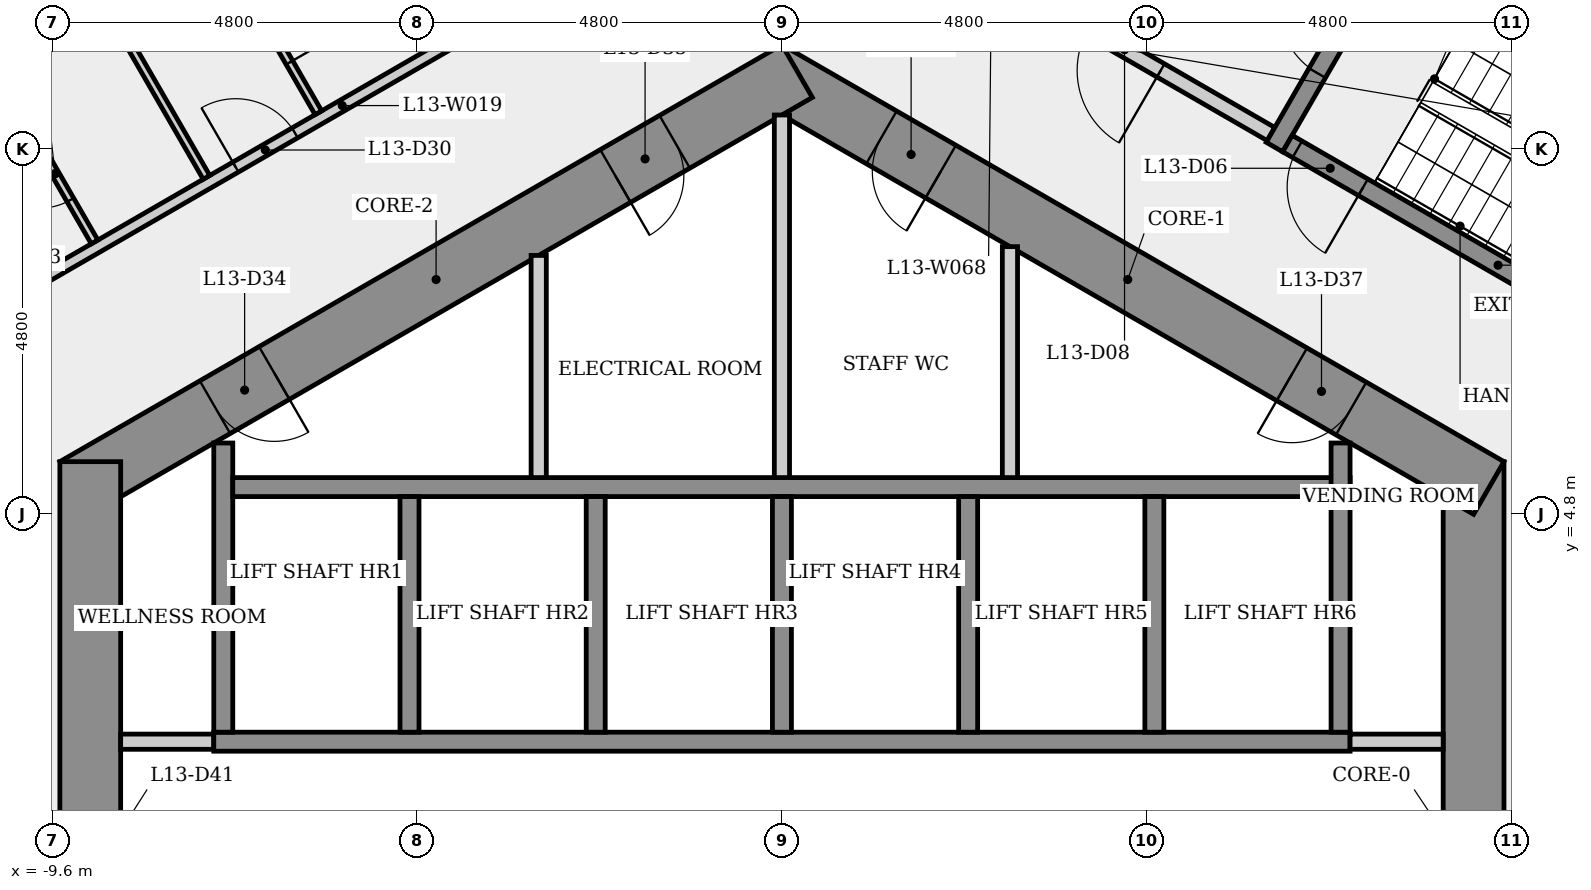
"""IFC4 building model, lengths in metres.
Left out: names, types, materials, properties, quantities, classifications, styles, units other than length and angle.
Written with IfcOpenShell. Run it as: python <this file> out.ifc"""

import sys

from ifc_helpers import new_model, si_unit, direction, frame, frame_2d, origin, place, context, subcontext, project, spatial, rectangle, extrude, element, fill, save


model = new_model("IFC4")
c1 = context("Model", 3, precision=1e-05, world=origin(), true_north=direction((0.0, 1.0)))
c2 = subcontext(c1, "Body", "Model", "MODEL_VIEW")
j1 = project(units=[si_unit("LENGTHUNIT", "METRE"), si_unit("PLANEANGLEUNIT", "RADIAN")], contexts=[c1])
p1 = place(None, origin())
s1 = spatial("IfcSite", under=j1, at=p1, CompositionType="ELEMENT")
p2 = place(p1, origin())
s2 = spatial("IfcBuilding", under=s1, at=p2, CompositionType="ELEMENT")
p3 = place(p2, frame((0.0, 0.0, 52.7)))
s3 = spatial("IfcBuildingStorey", under=s2, at=p3, CompositionType="ELEMENT", Elevation=52.7)
p4 = place(p3, frame((9.1, -5.485, 0.0), z_axis=(0.0, 0.0, 1.0), x_axis=(0.0, 1.0, 0.0)))
e1 = element("IfcWall", 1, at=p4, inside=s3, PredefinedType="SHEAR", context=c2, shape_type="SweptSolid", body=[
    extrude(rectangle(XDim=10.97, YDim=0.8, at=frame_2d((5.485, 0.0))), origin(), (0.0, 0.0, 1.0), 3.4),
])
p5 = place(p4, frame((4.685, 0.0, 0.0)))
e2 = element("IfcOpeningElement", 2, at=p5, cuts=e1, PredefinedType="OPENING", context=c2, shape_type="SweptSolid", body=[
    extrude(rectangle(XDim=1.6, YDim=2.1, at=frame_2d((0.8, 1.05))), frame((0.0, 0.41, 0.0), z_axis=(0.0, -1.0, 0.0), x_axis=(1.0, 0.0, 0.0)), (0.0, 0.0, 1.0), 0.82),
])
p6 = place(p3, frame((9.3, 5.138, 0.0), z_axis=(0.0, 0.0, 1.0), x_axis=(-0.866023993627, 0.500002442456, 0.0)))
e3 = element("IfcWall", 3, at=p6, inside=s3, PredefinedType="SHEAR", context=c2, shape_type="SweptSolid", body=[
    extrude(rectangle(XDim=10.97, YDim=0.8, at=frame_2d((5.485, 0.0))), origin(), (0.0, 0.0, 1.0), 3.4),
])
p7 = place(p6, frame((8.326, 0.0, 0.0)))
e4 = element("IfcOpeningElement", 4, at=p7, cuts=e3, PredefinedType="OPENING", context=c2, shape_type="SweptSolid", body=[
    extrude(rectangle(XDim=0.9, YDim=2.1, at=frame_2d((0.45, 1.05))), frame((0.0, 0.41, 0.0), z_axis=(0.0, -1.0, 0.0), x_axis=(1.0, 0.0, 0.0)), (0.0, 0.0, 1.0), 0.82),
])
p8 = place(p6, frame((2.091, 0.0, 0.0)))
e5 = element("IfcOpeningElement", 5, at=p8, cuts=e3, PredefinedType="OPENING", context=c2, shape_type="SweptSolid", body=[
    extrude(rectangle(XDim=0.9, YDim=2.1, at=frame_2d((0.45, 1.05))), frame((0.0, 0.41, 0.0), z_axis=(0.0, -1.0, 0.0), x_axis=(1.0, 0.0, 0.0)), (0.0, 0.0, 1.0), 0.82),
])
p9 = place(p3, frame((0.2, 10.623, 0.0), z_axis=(0.0, 0.0, 1.0), x_axis=(-0.866023993627, -0.500002442456, 0.0)))
e6 = element("IfcWall", 6, at=p9, inside=s3, PredefinedType="SHEAR", context=c2, shape_type="SweptSolid", body=[
    extrude(rectangle(XDim=10.97, YDim=0.8, at=frame_2d((5.485, 0.0))), origin(), (0.0, 0.0, 1.0), 3.4),
])
p10 = place(p9, frame((7.944, 0.0, 0.0)))
e7 = element("IfcOpeningElement", 7, at=p10, cuts=e6, PredefinedType="OPENING", context=c2, shape_type="SweptSolid", body=[
    extrude(rectangle(XDim=0.9, YDim=2.1, at=frame_2d((0.45, 1.05))), frame((0.0, 0.41, 0.0), z_axis=(0.0, -1.0, 0.0), x_axis=(1.0, 0.0, 0.0)), (0.0, 0.0, 1.0), 0.82),
])
p11 = place(p9, frame((1.86, 0.0, 0.0)))
e8 = element("IfcOpeningElement", 8, at=p11, cuts=e6, PredefinedType="OPENING", context=c2, shape_type="SweptSolid", body=[
    extrude(rectangle(XDim=0.9, YDim=2.1, at=frame_2d((0.45, 1.05))), frame((0.0, 0.41, 0.0), z_axis=(0.0, -1.0, 0.0), x_axis=(1.0, 0.0, 0.0)), (0.0, 0.0, 1.0), 0.82),
])
p12 = place(p3, frame((-9.1, 5.485, 0.0), z_axis=(0.0, 0.0, 1.0), x_axis=(0.0, -1.0, 0.0)))
e9 = element("IfcWall", 9, at=p12, inside=s3, PredefinedType="SHEAR", context=c2, shape_type="SweptSolid", body=[
    extrude(rectangle(XDim=10.97, YDim=0.8, at=frame_2d((5.485, 0.0))), origin(), (0.0, 0.0, 1.0), 3.4),
])
p13 = place(p12, frame((4.685, 0.0, 0.0)))
e10 = element("IfcOpeningElement", 10, at=p13, cuts=e9, PredefinedType="OPENING", context=c2, shape_type="SweptSolid", body=[
    extrude(rectangle(XDim=1.6, YDim=2.1, at=frame_2d((0.8, 1.05))), frame((0.0, 0.41, 0.0), z_axis=(0.0, -1.0, 0.0), x_axis=(1.0, 0.0, 0.0)), (0.0, 0.0, 1.0), 0.82),
])
p14 = place(p3, frame((-10.836, 7.254, 0.0), z_axis=(0.0, 0.0, 1.0), x_axis=(0.866028032582, 0.499995446761, 0.0)))
e11 = element("IfcWall", 11, at=p14, inside=s3, PredefinedType="PARTITIONING", context=c2, shape_type="SweptSolid", body=[
    extrude(rectangle(XDim=11.664, YDim=0.15, at=frame_2d((5.832, 0.0))), origin(), (0.0, 0.0, 1.0), 3.05),
])
p15 = place(p14, frame((4.213, 0.0, 0.0)))
e12 = element("IfcOpeningElement", 12, at=p15, cuts=e11, PredefinedType="OPENING", context=c2, shape_type="SweptSolid", body=[
    extrude(rectangle(XDim=0.9, YDim=2.1, at=frame_2d((0.45, 1.05))), frame((0.0, 0.085, 0.0), z_axis=(0.0, -1.0, 0.0), x_axis=(1.0, 0.0, 0.0)), (0.0, 0.0, 1.0), 0.17),
])
p16 = place(p3, frame((-9.043, 8.375, 0.0), z_axis=(0.0, 0.0, 1.0), x_axis=(-0.500011000363, 0.866019052629, 0.0)))
e13 = element("IfcWall", 13, at=p16, inside=s3, PredefinedType="PARTITIONING", context=c2, shape_type="SweptSolid", body=[
    extrude(rectangle(XDim=2.075, YDim=0.1, at=frame_2d((1.038, 0.0))), origin(), (0.0, 0.0, 1.0), 3.05),
])
p17 = place(p16, frame((0.637, 0.0, 0.0)))
e14 = element("IfcOpeningElement", 14, at=p17, cuts=e13, PredefinedType="OPENING", context=c2, shape_type="SweptSolid", body=[
    extrude(rectangle(XDim=0.8, YDim=2.1, at=frame_2d((0.4, 1.05))), frame((0.0, 0.06, 0.0), z_axis=(0.0, -1.0, 0.0), x_axis=(1.0, 0.0, 0.0)), (0.0, 0.0, 1.0), 0.12),
])
p18 = place(p3, frame((-8.7, 1.8, 0.0), z_axis=(0.0, 0.0, 1.0), x_axis=(1.0, 0.0, 0.0)))
e15 = element("IfcWall", 15, at=p18, inside=s3, PredefinedType="PARTITIONING", context=c2, shape_type="SweptSolid", body=[
    extrude(rectangle(XDim=1.225, YDim=0.2, at=frame_2d((0.613, 0.0))), origin(), (0.0, 0.0, 1.0), 3.05),
])
p19 = place(p3, frame((-7.571, 9.226, 0.0), z_axis=(0.0, 0.0, 1.0), x_axis=(-0.499989081013, 0.866031707772, 0.0)))
e16 = element("IfcWall", 16, at=p19, inside=s3, PredefinedType="PARTITIONING", context=c2, shape_type="SweptSolid", body=[
    extrude(rectangle(XDim=9.01, YDim=0.1, at=frame_2d((4.505, 0.0))), origin(), (0.0, 0.0, 1.0), 3.05),
])
p20 = place(p3, frame((-7.475, 1.8, 0.0), z_axis=(0.0, 0.0, 1.0), x_axis=(1.0, 0.0, 0.0)))
e17 = element("IfcWall", 17, at=p20, inside=s3, PredefinedType="SHEAR", context=c2, shape_type="SweptSolid", body=[
    extrude(rectangle(XDim=14.95, YDim=0.25, at=frame_2d((7.475, 0.0))), origin(), (0.0, 0.0, 1.0), 3.05),
])
p21 = place(p3, frame((-7.35, 1.925, 0.0), z_axis=(0.0, 0.0, 1.0), x_axis=(0.0, 1.0, 0.0)))
e18 = element("IfcWall", 18, at=p21, inside=s3, PredefinedType="SHEAR", context=c2, shape_type="SweptSolid", body=[
    extrude(rectangle(XDim=3.805, YDim=0.25, at=frame_2d((1.903, 0.0))), origin(), (0.0, 0.0, 1.0), 3.05),
])
p22 = place(p3, frame((-7.225, 5.15, 0.0), z_axis=(0.0, 0.0, 1.0), x_axis=(1.0, 0.0, 0.0)))
e19 = element("IfcWall", 19, at=p22, inside=s3, PredefinedType="SHEAR", context=c2, shape_type="SweptSolid", body=[
    extrude(rectangle(XDim=14.7, YDim=0.25, at=frame_2d((7.35, 0.0))), origin(), (0.0, 0.0, 1.0), 3.05),
])
p23 = place(p3, frame((-7.286, 12.132, 0.0), z_axis=(0.0, 0.0, 1.0), x_axis=(0.499986429846, -0.866033238375, 0.0)))
e20 = element("IfcWall", 20, at=p23, inside=s3, PredefinedType="PARTITIONING", context=c2, shape_type="SweptSolid", body=[
    extrude(rectangle(XDim=2.375, YDim=0.1, at=frame_2d((1.188, 0.0))), origin(), (0.0, 0.0, 1.0), 3.05),
])
p24 = place(p23, frame((0.812, 0.0, 0.0)))
e21 = element("IfcOpeningElement", 21, at=p24, cuts=e20, PredefinedType="OPENING", context=c2, shape_type="SweptSolid", body=[
    extrude(rectangle(XDim=0.8, YDim=2.1, at=frame_2d((0.4, 1.05))), frame((0.0, 0.06, 0.0), z_axis=(0.0, -1.0, 0.0), x_axis=(1.0, 0.0, 0.0)), (0.0, 0.0, 1.0), 0.12),
])
p25 = place(p3, frame((-4.9, 5.025, 0.0), z_axis=(0.0, 0.0, 1.0), x_axis=(0.0, -1.0, 0.0)))
e22 = element("IfcWall", 22, at=p25, inside=s3, PredefinedType="SHEAR", context=c2, shape_type="SweptSolid", body=[
    extrude(rectangle(XDim=3.1, YDim=0.25, at=frame_2d((1.55, 0.0))), origin(), (0.0, 0.0, 1.0), 3.4),
])
p26 = place(p3, frame((-3.2, 8.198, 0.0), z_axis=(0.0, 0.0, 1.0), x_axis=(0.0, -1.0, 0.0)))
e23 = element("IfcWall", 23, at=p26, inside=s3, PredefinedType="PARTITIONING", context=c2, shape_type="SweptSolid", body=[
    extrude(rectangle(XDim=2.924, YDim=0.2, at=frame_2d((1.462, 0.0))), origin(), (0.0, 0.0, 1.0), 3.05),
])
for number, where, z_axis, x_axis in (
    (24, (-2.45, 5.025, 0.0), (0.0, 0.0, 1.0), (0.0, -1.0, 0.0)),
    (25, (0.0, 5.025, 0.0), (0.0, 0.0, 1.0), (0.0, -1.0, 0.0)),
):
    element("IfcWall", number, at=place(p3, frame(where, z_axis=z_axis, x_axis=x_axis)), inside=s3, PredefinedType="SHEAR", context=c2, shape_type="SweptSolid", body=[
        extrude(rectangle(XDim=3.1, YDim=0.25, at=frame_2d((1.55, 0.0))), origin(), (0.0, 0.0, 1.0), 3.4),
    ])
p27 = place(p3, frame((0.0, 10.046, 0.0), z_axis=(0.0, 0.0, 1.0), x_axis=(0.0, -1.0, 0.0)))
e26 = element("IfcWall", 26, at=p27, inside=s3, PredefinedType="PARTITIONING", context=c2, shape_type="SweptSolid", body=[
    extrude(rectangle(XDim=4.771, YDim=0.2, at=frame_2d((2.385, 0.0))), origin(), (0.0, 0.0, 1.0), 3.05),
])
p28 = place(p3, frame((2.45, 5.025, 0.0), z_axis=(0.0, 0.0, 1.0), x_axis=(0.0, -1.0, 0.0)))
e27 = element("IfcWall", 27, at=p28, inside=s3, PredefinedType="SHEAR", context=c2, shape_type="SweptSolid", body=[
    extrude(rectangle(XDim=3.1, YDim=0.25, at=frame_2d((1.55, 0.0))), origin(), (0.0, 0.0, 1.0), 3.4),
])
p29 = place(p3, frame((3.0, 8.314, 0.0), z_axis=(0.0, 0.0, 1.0), x_axis=(0.0, -1.0, 0.0)))
e28 = element("IfcWall", 28, at=p29, inside=s3, PredefinedType="PARTITIONING", context=c2, shape_type="SweptSolid", body=[
    extrude(rectangle(XDim=3.039, YDim=0.2, at=frame_2d((1.52, 0.0))), origin(), (0.0, 0.0, 1.0), 3.05),
])
p30 = place(p3, frame((4.9, 5.025, 0.0), z_axis=(0.0, 0.0, 1.0), x_axis=(0.0, -1.0, 0.0)))
e29 = element("IfcWall", 29, at=p30, inside=s3, PredefinedType="SHEAR", context=c2, shape_type="SweptSolid", body=[
    extrude(rectangle(XDim=3.1, YDim=0.25, at=frame_2d((1.55, 0.0))), origin(), (0.0, 0.0, 1.0), 3.4),
])
p31 = place(p3, frame((6.435, 9.795, 0.0), z_axis=(0.0, 0.0, 1.0), x_axis=(-0.866012907634, 0.500021643343, 0.0)))
e30 = element("IfcWall", 30, at=p31, inside=s3, PredefinedType="PARTITIONING", context=c2, shape_type="SweptSolid", body=[
    extrude(rectangle(XDim=4.45, YDim=0.2, at=frame_2d((2.225, 0.0))), origin(), (0.0, 0.0, 1.0), 3.05),
])
p32 = place(p31, frame((1.675, 0.0, 0.0)))
e31 = element("IfcOpeningElement", 31, at=p32, cuts=e30, PredefinedType="OPENING", context=c2, shape_type="SweptSolid", body=[
    extrude(rectangle(XDim=1.1, YDim=2.1, at=frame_2d((0.55, 1.05))), frame((0.0, 0.11, 0.0), z_axis=(0.0, -1.0, 0.0), x_axis=(1.0, 0.0, 0.0)), (0.0, 0.0, 1.0), 0.22),
])
p33 = place(p3, frame((6.48, 9.624, 0.0), z_axis=(0.0, 0.0, 1.0), x_axis=(0.500017246033, 0.866015446554, 0.0)))
e32 = element("IfcWall", 32, at=p33, inside=s3, PredefinedType="SHEAR", context=c2, shape_type="SweptSolid", body=[
    extrude(rectangle(XDim=3.25, YDim=0.25, at=frame_2d((1.625, 0.0))), origin(), (0.0, 0.0, 1.0), 3.05),
])
p34 = place(p33, frame((1.125, 0.0, 0.0)))
e33 = element("IfcOpeningElement", 33, at=p34, cuts=e32, PredefinedType="OPENING", context=c2, shape_type="SweptSolid", body=[
    extrude(rectangle(XDim=1.0, YDim=2.1, at=frame_2d((0.5, 1.05))), frame((0.0, 0.135, 0.0), z_axis=(0.0, -1.0, 0.0), x_axis=(1.0, 0.0, 0.0)), (0.0, 0.0, 1.0), 0.27),
])
p35 = place(p3, frame((7.475, 1.8, 0.0), z_axis=(0.0, 0.0, 1.0), x_axis=(1.0, 0.0, 0.0)))
e34 = element("IfcWall", 34, at=p35, inside=s3, PredefinedType="PARTITIONING", context=c2, shape_type="SweptSolid", body=[
    extrude(rectangle(XDim=1.225, YDim=0.2, at=frame_2d((0.613, 0.0))), origin(), (0.0, 0.0, 1.0), 3.05),
])
p36 = place(p3, frame((7.35, 5.73, 0.0), z_axis=(0.0, 0.0, 1.0), x_axis=(0.0, -1.0, 0.0)))
e35 = element("IfcWall", 35, at=p36, inside=s3, PredefinedType="SHEAR", context=c2, shape_type="SweptSolid", body=[
    extrude(rectangle(XDim=3.805, YDim=0.25, at=frame_2d((1.903, 0.0))), origin(), (0.0, 0.0, 1.0), 3.05),
])
p37 = place(p3, frame((8.151, 12.268, 0.0), z_axis=(0.0, 0.0, 1.0), x_axis=(0.866025499775, -0.499999833739, 0.0)))
e36 = element("IfcWall", 36, at=p37, inside=s3, PredefinedType="SHEAR", context=c2, shape_type="SweptSolid", body=[
    extrude(rectangle(XDim=6.4, YDim=0.25, at=frame_2d((3.2, 0.0))), origin(), (0.0, 0.0, 1.0), 3.05),
])
p38 = place(p3, frame((12.194, 6.47, 0.0), z_axis=(0.0, 0.0, 1.0), x_axis=(-0.866025499775, 0.499999833739, 0.0)))
e37 = element("IfcWall", 37, at=p38, inside=s3, PredefinedType="SHEAR", context=c2, shape_type="SweptSolid", body=[
    extrude(rectangle(XDim=6.4, YDim=0.25, at=frame_2d((3.2, 0.0))), origin(), (0.0, 0.0, 1.0), 3.05),
])
p39 = place(p38, frame((5.25, 0.0, 0.0)))
e38 = element("IfcOpeningElement", 38, at=p39, cuts=e37, PredefinedType="OPENING", context=c2, shape_type="SweptSolid", body=[
    extrude(rectangle(XDim=1.0, YDim=2.1, at=frame_2d((0.5, 1.05))), frame((0.0, 0.135, 0.0), z_axis=(0.0, -1.0, 0.0), x_axis=(1.0, 0.0, 0.0)), (0.0, 0.0, 1.0), 0.27),
])
p40 = place(p39, origin())
e39 = element("IfcDoor", 39, at=p40, inside=s3, OperationType="SINGLE_SWING_LEFT", PredefinedType="DOOR", context=c2, shape_type="SweptSolid", body=[
    extrude(rectangle(XDim=1.0, YDim=2.1, at=frame_2d((0.5, 1.05))), frame((0.0, 0.025, 0.0), z_axis=(0.0, -1.0, 0.0), x_axis=(1.0, 0.0, 0.0)), (0.0, 0.0, 1.0), 0.05),
])
fill(e38, e39)
p41 = place(p34, origin())
e40 = element("IfcDoor", 40, at=p41, inside=s3, OperationType="SINGLE_SWING_RIGHT", PredefinedType="DOOR", context=c2, shape_type="SweptSolid", body=[
    extrude(rectangle(XDim=1.0, YDim=2.1, at=frame_2d((0.5, 1.05))), frame((0.0, 0.025, 0.0), z_axis=(0.0, -1.0, 0.0), x_axis=(1.0, 0.0, 0.0)), (0.0, 0.0, 1.0), 0.05),
])
fill(e33, e40)
p42 = place(p32, origin())
e41 = element("IfcDoor", 41, at=p42, inside=s3, OperationType="SINGLE_SWING_LEFT", PredefinedType="DOOR", context=c2, shape_type="SweptSolid", body=[
    extrude(rectangle(XDim=1.1, YDim=2.1, at=frame_2d((0.55, 1.05))), frame((0.0, 0.025, 0.0), z_axis=(0.0, -1.0, 0.0), x_axis=(1.0, 0.0, 0.0)), (0.0, 0.0, 1.0), 0.05),
])
fill(e31, e41)
p43 = place(p15, origin())
e42 = element("IfcDoor", 42, at=p43, inside=s3, OperationType="SINGLE_SWING_LEFT", PredefinedType="DOOR", context=c2, shape_type="SweptSolid", body=[
    extrude(rectangle(XDim=0.9, YDim=2.1, at=frame_2d((0.45, 1.05))), frame((0.0, 0.025, 0.0), z_axis=(0.0, -1.0, 0.0), x_axis=(1.0, 0.0, 0.0)), (0.0, 0.0, 1.0), 0.05),
])
fill(e12, e42)
p44 = place(p24, origin())
e43 = element("IfcDoor", 43, at=p44, inside=s3, OperationType="SINGLE_SWING_RIGHT", PredefinedType="DOOR", context=c2, shape_type="SweptSolid", body=[
    extrude(rectangle(XDim=0.8, YDim=2.1, at=frame_2d((0.4, 1.05))), frame((0.0, 0.025, 0.0), z_axis=(0.0, -1.0, 0.0), x_axis=(1.0, 0.0, 0.0)), (0.0, 0.0, 1.0), 0.05),
])
fill(e21, e43)
p45 = place(p17, origin())
e44 = element("IfcDoor", 44, at=p45, inside=s3, OperationType="SINGLE_SWING_RIGHT", PredefinedType="DOOR", context=c2, shape_type="SweptSolid", body=[
    extrude(rectangle(XDim=0.8, YDim=2.1, at=frame_2d((0.4, 1.05))), frame((0.0, 0.025, 0.0), z_axis=(0.0, -1.0, 0.0), x_axis=(1.0, 0.0, 0.0)), (0.0, 0.0, 1.0), 0.05),
])
fill(e14, e44)
p46 = place(p10, origin())
e45 = element("IfcDoor", 45, at=p46, inside=s3, OperationType="SINGLE_SWING_LEFT", PredefinedType="DOOR", context=c2, shape_type="SweptSolid", body=[
    extrude(rectangle(XDim=0.9, YDim=2.1, at=frame_2d((0.45, 1.05))), frame((0.0, 0.025, 0.0), z_axis=(0.0, -1.0, 0.0), x_axis=(1.0, 0.0, 0.0)), (0.0, 0.0, 1.0), 0.05),
])
fill(e7, e45)
p47 = place(p11, origin())
e46 = element("IfcDoor", 46, at=p47, inside=s3, OperationType="SINGLE_SWING_RIGHT", PredefinedType="DOOR", context=c2, shape_type="SweptSolid", body=[
    extrude(rectangle(XDim=0.9, YDim=2.1, at=frame_2d((0.45, 1.05))), frame((0.0, 0.025, 0.0), z_axis=(0.0, -1.0, 0.0), x_axis=(1.0, 0.0, 0.0)), (0.0, 0.0, 1.0), 0.05),
])
fill(e8, e46)
p48 = place(p7, origin())
e47 = element("IfcDoor", 47, at=p48, inside=s3, OperationType="SINGLE_SWING_LEFT", PredefinedType="DOOR", context=c2, shape_type="SweptSolid", body=[
    extrude(rectangle(XDim=0.9, YDim=2.1, at=frame_2d((0.45, 1.05))), frame((0.0, 0.025, 0.0), z_axis=(0.0, -1.0, 0.0), x_axis=(1.0, 0.0, 0.0)), (0.0, 0.0, 1.0), 0.05),
])
fill(e4, e47)
p49 = place(p8, origin())
e48 = element("IfcDoor", 48, at=p49, inside=s3, OperationType="SINGLE_SWING_RIGHT", PredefinedType="DOOR", context=c2, shape_type="SweptSolid", body=[
    extrude(rectangle(XDim=0.9, YDim=2.1, at=frame_2d((0.45, 1.05))), frame((0.0, 0.025, 0.0), z_axis=(0.0, -1.0, 0.0), x_axis=(1.0, 0.0, 0.0)), (0.0, 0.0, 1.0), 0.05),
])
fill(e5, e48)
save(model, sys.argv[1])
